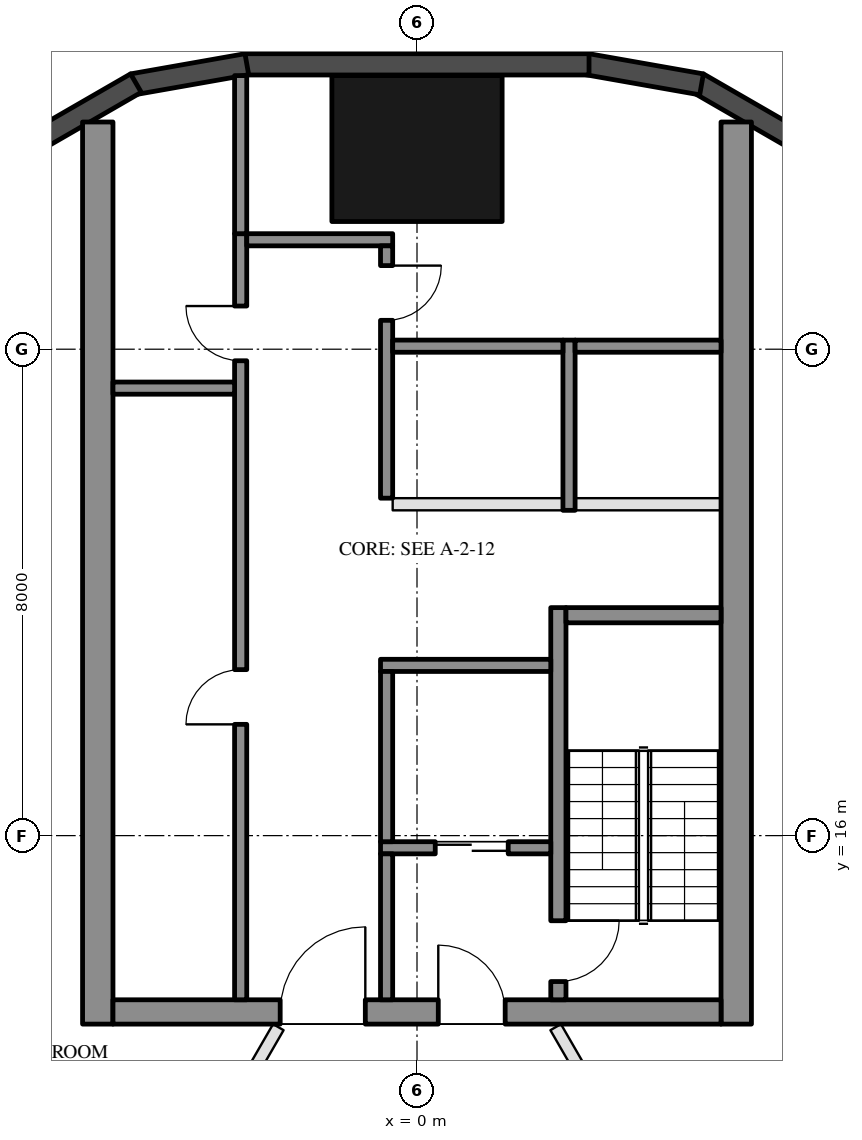
"""IFC4 building model, lengths in metres.
Left out: names, types, materials, properties, quantities, classifications, styles, units other than length and angle.
Written with IfcOpenShell. Run it as: python <this file> out.ifc"""

import sys

from ifc_helpers import new_model, si_unit, direction, frame, frame_2d, origin, origin_2d, place, context, subcontext, project, spatial, rectangle, hollow_rectangle, extrude, element, fill, save


model = new_model("IFC4")
c1 = context("Model", 3, precision=1e-05, world=origin(), true_north=direction((0.0, 1.0)))
c2 = subcontext(c1, "Body", "Model", "MODEL_VIEW")
j1 = project(units=[si_unit("LENGTHUNIT", "METRE"), si_unit("PLANEANGLEUNIT", "RADIAN")], contexts=[c1])
p1 = place(None, origin())
s1 = spatial("IfcSite", under=j1, at=p1, CompositionType="ELEMENT")
p2 = place(p1, origin())
s2 = spatial("IfcBuilding", under=s1, at=p2, CompositionType="ELEMENT")
p3 = place(p2, frame((0.0, 0.0, 57.6)))
s3 = spatial("IfcBuildingStorey", under=s2, at=p3, CompositionType="ELEMENT", Elevation=57.6)
p4 = place(p3, frame((0.0, 27.3, 0.0), z_axis=(0.0, 0.0, 1.0), x_axis=(1.0, 0.0, 0.0)))
e1 = element("IfcColumn", 1, at=p4, inside=s3, PredefinedType="COLUMN", context=c2, shape_type="SweptSolid", body=[
    extrude(hollow_rectangle(XDim=2.8, YDim=2.4, WallThickness=0.07, at=origin_2d()), origin(), (0.0, 0.0, 1.0), 3.7),
])
for number, where, z_axis, x_axis in (
    (2, (6.277, 27.422, 0.0), (0.0, 0.0, 1.0), (-0.866, 0.5, 0.0)),
    (3, (4.68, 28.356, 0.0), (0.0, 0.0, 1.0), (-0.985, 0.174, 0.0)),
):
    element("IfcWall", number, at=place(p3, frame(where, z_axis=z_axis, x_axis=x_axis)), inside=s3, PredefinedType="SOLIDWALL", context=c2, shape_type="SweptSolid", body=[
        extrude(rectangle(XDim=1.91, YDim=0.35, at=frame_2d((0.955, 0.0))), origin(), (0.0, 0.0, 1.0), 3.55),
    ])
p5 = place(p3, frame((2.829, 28.685, 0.0), z_axis=(0.0, 0.0, 1.0), x_axis=(-1.0, 0.0, 0.0)))
e4 = element("IfcWall", 4, at=p5, inside=s3, PredefinedType="SOLIDWALL", context=c2, shape_type="SweptSolid", body=[
    extrude(rectangle(XDim=5.658, YDim=0.35, at=frame_2d((2.829, 0.0))), origin(), (0.0, 0.0, 1.0), 3.55),
])
for number, where, z_axis, x_axis in (
    (5, (-2.799, 28.688, 0.0), (0.0, 0.0, 1.0), (-0.985, -0.174, 0.0)),
    (6, (-4.623, 28.377, 0.0), (0.0, 0.0, 1.0), (-0.866, -0.5, 0.0)),
):
    element("IfcWall", number, at=place(p3, frame(where, z_axis=z_axis, x_axis=x_axis)), inside=s3, PredefinedType="SOLIDWALL", context=c2, shape_type="SweptSolid", body=[
        extrude(rectangle(XDim=1.91, YDim=0.35, at=frame_2d((0.955, 0.0))), origin(), (0.0, 0.0, 1.0), 3.55),
    ])
for number, where, z_axis, x_axis in (
    (7, (5.25, 12.9, 0.0), (0.0, 0.0, 1.0), (0.0, 1.0, 0.0)),
    (8, (-5.25, 12.9, 0.0), (0.0, 0.0, 1.0), (0.0, 1.0, 0.0)),
):
    element("IfcWall", number, at=place(p3, frame(where, z_axis=z_axis, x_axis=x_axis)), inside=s3, PredefinedType="SHEAR", context=c2, shape_type="SweptSolid", body=[
        extrude(rectangle(XDim=14.837, YDim=0.5, at=frame_2d((7.418, 0.0))), origin(), (0.0, 0.0, 1.0), 3.5),
    ])
p6 = place(p3, frame((5.0, 13.1, 0.0), z_axis=(0.0, 0.0, 1.0), x_axis=(-1.0, 0.0, 0.0)))
e9 = element("IfcWall", 9, at=p6, inside=s3, PredefinedType="SHEAR", context=c2, shape_type="SweptSolid", body=[
    extrude(rectangle(XDim=10.0, YDim=0.4, at=frame_2d((5.0, 0.0))), origin(), (0.0, 0.0, 1.0), 3.5),
])
p7 = place(p6, frame((3.55, 0.0, 0.0)))
e10 = element("IfcOpeningElement", 10, at=p7, cuts=e9, PredefinedType="OPENING", context=c2, shape_type="SweptSolid", body=[
    extrude(rectangle(XDim=1.1, YDim=2.1, at=frame_2d((0.55, 1.05))), frame((0.0, 0.21, 0.0), z_axis=(0.0, -1.0, 0.0), x_axis=(1.0, 0.0, 0.0)), (0.0, 0.0, 1.0), 0.42),
])
p8 = place(p6, frame((5.85, 0.0, 0.0)))
e11 = element("IfcOpeningElement", 11, at=p8, cuts=e9, PredefinedType="OPENING", context=c2, shape_type="SweptSolid", body=[
    extrude(rectangle(XDim=1.4, YDim=2.1, at=frame_2d((0.7, 1.05))), frame((0.0, 0.21, 0.0), z_axis=(0.0, -1.0, 0.0), x_axis=(1.0, 0.0, 0.0)), (0.0, 0.0, 1.0), 0.42),
])
p9 = place(p3, frame((2.325, 13.3, 0.0), z_axis=(0.0, 0.0, 1.0), x_axis=(0.0, 1.0, 0.0)))
e12 = element("IfcWall", 12, at=p9, inside=s3, PredefinedType="SHEAR", context=c2, shape_type="SweptSolid", body=[
    extrude(rectangle(XDim=6.45, YDim=0.25, at=frame_2d((3.225, 0.0))), origin(), (0.0, 0.0, 1.0), 3.5),
])
p10 = place(p9, frame((0.3, 0.0, 0.0)))
e13 = element("IfcOpeningElement", 13, at=p10, cuts=e12, PredefinedType="OPENING", context=c2, shape_type="SweptSolid", body=[
    extrude(rectangle(XDim=1.0, YDim=2.1, at=frame_2d((0.5, 1.05))), frame((0.0, 0.135, 0.0), z_axis=(0.0, -1.0, 0.0), x_axis=(1.0, 0.0, 0.0)), (0.0, 0.0, 1.0), 0.27),
])
p11 = place(p3, frame((5.0, 19.625, 0.0), z_axis=(0.0, 0.0, 1.0), x_axis=(-1.0, 0.0, 0.0)))
e14 = element("IfcWall", 14, at=p11, inside=s3, PredefinedType="SHEAR", context=c2, shape_type="SweptSolid", body=[
    extrude(rectangle(XDim=2.55, YDim=0.25, at=frame_2d((1.275, 0.0))), origin(), (0.0, 0.0, 1.0), 3.5),
])
p12 = place(p3, frame((2.2, 18.8, 0.0), z_axis=(0.0, 0.0, 1.0), x_axis=(-1.0, 0.0, 0.0)))
e15 = element("IfcWall", 15, at=p12, inside=s3, PredefinedType="SHEAR", context=c2, shape_type="SweptSolid", body=[
    extrude(rectangle(XDim=2.8, YDim=0.2, at=frame_2d((1.4, 0.0))), origin(), (0.0, 0.0, 1.0), 3.5),
])
p13 = place(p3, frame((2.2, 15.8, 0.0), z_axis=(0.0, 0.0, 1.0), x_axis=(-1.0, 0.0, 0.0)))
e16 = element("IfcWall", 16, at=p13, inside=s3, PredefinedType="SHEAR", context=c2, shape_type="SweptSolid", body=[
    extrude(rectangle(XDim=2.8, YDim=0.2, at=frame_2d((1.4, 0.0))), origin(), (0.0, 0.0, 1.0), 3.5),
])
p14 = place(p13, frame((0.7, 0.0, 0.0)))
e17 = element("IfcOpeningElement", 17, at=p14, cuts=e16, PredefinedType="OPENING", context=c2, shape_type="SweptSolid", body=[
    extrude(rectangle(XDim=1.2, YDim=2.1, at=frame_2d((0.6, 1.05))), frame((0.0, 0.11, 0.0), z_axis=(0.0, -1.0, 0.0), x_axis=(1.0, 0.0, 0.0)), (0.0, 0.0, 1.0), 0.22),
])
p15 = place(p3, frame((-0.5, 15.9, 0.0), z_axis=(0.0, 0.0, 1.0), x_axis=(0.0, 1.0, 0.0)))
e18 = element("IfcWall", 18, at=p15, inside=s3, PredefinedType="SHEAR", context=c2, shape_type="SweptSolid", body=[
    extrude(rectangle(XDim=2.8, YDim=0.2, at=frame_2d((1.4, 0.0))), origin(), (0.0, 0.0, 1.0), 3.5),
])
p16 = place(p3, frame((-0.5, 13.3, 0.0), z_axis=(0.0, 0.0, 1.0), x_axis=(0.0, 1.0, 0.0)))
e19 = element("IfcWall", 19, at=p16, inside=s3, PredefinedType="SHEAR", context=c2, shape_type="SweptSolid", body=[
    extrude(rectangle(XDim=2.4, YDim=0.2, at=frame_2d((1.2, 0.0))), origin(), (0.0, 0.0, 1.0), 3.5),
])
p17 = place(p3, frame((-2.9, 13.3, 0.0), z_axis=(0.0, 0.0, 1.0), x_axis=(0.0, 1.0, 0.0)))
e20 = element("IfcWall", 20, at=p17, inside=s3, PredefinedType="SHEAR", context=c2, shape_type="SweptSolid", body=[
    extrude(rectangle(XDim=12.6, YDim=0.2, at=frame_2d((6.3, 0.0))), origin(), (0.0, 0.0, 1.0), 3.5),
])
p18 = place(p17, frame((4.53, 0.0, 0.0)))
e21 = element("IfcOpeningElement", 21, at=p18, cuts=e20, PredefinedType="OPENING", context=c2, shape_type="SweptSolid", body=[
    extrude(rectangle(XDim=0.9, YDim=2.1, at=frame_2d((0.45, 1.05))), frame((0.0, 0.11, 0.0), z_axis=(0.0, -1.0, 0.0), x_axis=(1.0, 0.0, 0.0)), (0.0, 0.0, 1.0), 0.22),
])
p19 = place(p17, frame((10.51, 0.0, 0.0)))
e22 = element("IfcOpeningElement", 22, at=p19, cuts=e20, PredefinedType="OPENING", context=c2, shape_type="SweptSolid", body=[
    extrude(rectangle(XDim=0.9, YDim=2.1, at=frame_2d((0.45, 1.05))), frame((0.0, 0.11, 0.0), z_axis=(0.0, -1.0, 0.0), x_axis=(1.0, 0.0, 0.0)), (0.0, 0.0, 1.0), 0.22),
])
p20 = place(p3, frame((-0.4, 25.8, 0.0), z_axis=(0.0, 0.0, 1.0), x_axis=(-1.0, 0.0, 0.0)))
e23 = element("IfcWall", 23, at=p20, inside=s3, PredefinedType="SHEAR", context=c2, shape_type="SweptSolid", body=[
    extrude(rectangle(XDim=2.4, YDim=0.2, at=frame_2d((1.2, 0.0))), origin(), (0.0, 0.0, 1.0), 3.5),
])
p21 = place(p3, frame((-0.5, 21.55, 0.0), z_axis=(0.0, 0.0, 1.0), x_axis=(0.0, 1.0, 0.0)))
e24 = element("IfcWall", 24, at=p21, inside=s3, PredefinedType="SHEAR", context=c2, shape_type="SweptSolid", body=[
    extrude(rectangle(XDim=4.15, YDim=0.2, at=frame_2d((2.075, 0.0))), origin(), (0.0, 0.0, 1.0), 3.5),
])
p22 = place(p21, frame((2.925, 0.0, 0.0)))
e25 = element("IfcOpeningElement", 25, at=p22, cuts=e24, PredefinedType="OPENING", context=c2, shape_type="SweptSolid", body=[
    extrude(rectangle(XDim=0.9, YDim=2.1, at=frame_2d((0.45, 1.05))), frame((0.0, 0.11, 0.0), z_axis=(0.0, -1.0, 0.0), x_axis=(1.0, 0.0, 0.0)), (0.0, 0.0, 1.0), 0.22),
])
p23 = place(p3, frame((-3.0, 23.36, 0.0), z_axis=(0.0, 0.0, 1.0), x_axis=(-1.0, 0.0, 0.0)))
e26 = element("IfcWall", 26, at=p23, inside=s3, PredefinedType="SHEAR", context=c2, shape_type="SweptSolid", body=[
    extrude(rectangle(XDim=2.0, YDim=0.2, at=frame_2d((1.0, 0.0))), origin(), (0.0, 0.0, 1.0), 3.5),
])
p24 = place(p3, frame((-2.9, 25.9, 0.0), z_axis=(0.0, 0.0, 1.0), x_axis=(0.0, 1.0, 0.0)))
e27 = element("IfcWall", 27, at=p24, inside=s3, PredefinedType="SHEAR", context=c2, shape_type="SweptSolid", body=[
    extrude(rectangle(XDim=2.6, YDim=0.2, at=frame_2d((1.3, 0.0))), origin(), (0.0, 0.0, 1.0), 3.5),
])
p25 = place(p3, frame((2.5, 21.35, 0.0), z_axis=(0.0, 0.0, 1.0), x_axis=(0.0, 1.0, 0.0)))
e28 = element("IfcWall", 28, at=p25, inside=s3, PredefinedType="SHEAR", context=c2, shape_type="SweptSolid", body=[
    extrude(rectangle(XDim=2.8, YDim=0.2, at=frame_2d((1.4, 0.0))), origin(), (0.0, 0.0, 1.0), 3.5),
])
p26 = place(p3, frame((5.0, 24.05, 0.0), z_axis=(0.0, 0.0, 1.0), x_axis=(-1.0, 0.0, 0.0)))
e29 = element("IfcWall", 29, at=p26, inside=s3, PredefinedType="SHEAR", context=c2, shape_type="SweptSolid", body=[
    extrude(rectangle(XDim=2.4, YDim=0.2, at=frame_2d((1.2, 0.0))), origin(), (0.0, 0.0, 1.0), 3.5),
])
p27 = place(p3, frame((2.4, 24.05, 0.0), z_axis=(0.0, 0.0, 1.0), x_axis=(-1.0, 0.0, 0.0)))
e30 = element("IfcWall", 30, at=p27, inside=s3, PredefinedType="SHEAR", context=c2, shape_type="SweptSolid", body=[
    extrude(rectangle(XDim=2.8, YDim=0.2, at=frame_2d((1.4, 0.0))), origin(), (0.0, 0.0, 1.0), 3.5),
])
p28 = place(p3, frame((5.0, 21.45, 0.0), z_axis=(0.0, 0.0, 1.0), x_axis=(-1.0, 0.0, 0.0)))
e31 = element("IfcWall", 31, at=p28, inside=s3, PredefinedType="PARTITIONING", context=c2, shape_type="SweptSolid", body=[
    extrude(rectangle(XDim=2.4, YDim=0.2, at=frame_2d((1.2, 0.0))), origin(), (0.0, 0.0, 1.0), 3.5),
])
p29 = place(p3, frame((2.4, 21.45, 0.0), z_axis=(0.0, 0.0, 1.0), x_axis=(-1.0, 0.0, 0.0)))
e32 = element("IfcWall", 32, at=p29, inside=s3, PredefinedType="PARTITIONING", context=c2, shape_type="SweptSolid", body=[
    extrude(rectangle(XDim=2.8, YDim=0.2, at=frame_2d((1.4, 0.0))), origin(), (0.0, 0.0, 1.0), 3.5),
])
p30 = place(p3, frame((-13.936, 12.622, 0.0), z_axis=(0.0, 0.0, 1.0), x_axis=(0.872898889426, -0.487901146585, 0.0)))
e33 = element("IfcWall", 33, at=p30, inside=s3, PredefinedType="PARTITIONING", context=c2, shape_type="SweptSolid", body=[
    extrude(rectangle(XDim=10.081, YDim=0.2, at=frame_2d((5.041, 0.0))), origin(), (0.0, 0.0, 1.0), 2.95),
])
p31 = place(p3, frame((2.281, 12.85, 0.0), z_axis=(0.0, 0.0, 1.0), x_axis=(0.499997198377, -0.866027021296, 0.0)))
e34 = element("IfcWall", 34, at=p31, inside=s3, PredefinedType="PARTITIONING", context=c2, shape_type="SweptSolid", body=[
    extrude(rectangle(XDim=8.487, YDim=0.2, at=frame_2d((4.243, 0.0))), origin(), (0.0, 0.0, 1.0), 2.95),
])
p32 = place(p31, frame((3.743, 0.0, 0.0)))
e35 = element("IfcOpeningElement", 35, at=p32, cuts=e34, PredefinedType="OPENING", context=c2, shape_type="SweptSolid", body=[
    extrude(rectangle(XDim=1.0, YDim=2.1, at=frame_2d((0.5, 1.05))), frame((0.0, 0.11, 0.0), z_axis=(0.0, -1.0, 0.0), x_axis=(1.0, 0.0, 0.0)), (0.0, 0.0, 1.0), 0.22),
])
p33 = place(p3, frame((-5.174, 7.838, 0.0), z_axis=(0.0, 0.0, 1.0), x_axis=(0.499973220989, 0.866040864101, 0.0)))
e36 = element("IfcWall", 36, at=p33, inside=s3, PredefinedType="PARTITIONING", context=c2, shape_type="SweptSolid", body=[
    extrude(rectangle(XDim=5.787, YDim=0.2, at=frame_2d((2.894, 0.0))), origin(), (0.0, 0.0, 1.0), 2.95),
])
p34 = place(p33, frame((2.393, 0.0, 0.0)))
e37 = element("IfcOpeningElement", 37, at=p34, cuts=e36, PredefinedType="OPENING", context=c2, shape_type="SweptSolid", body=[
    extrude(rectangle(XDim=1.0, YDim=2.1, at=frame_2d((0.5, 1.05))), frame((0.0, 0.11, 0.0), z_axis=(0.0, -1.0, 0.0), x_axis=(1.0, 0.0, 0.0)), (0.0, 0.0, 1.0), 0.22),
])
p35 = place(p14, origin())
e38 = element("IfcDoor", 38, at=p35, inside=s3, OperationType="DOUBLE_DOOR_SLIDING", PredefinedType="DOOR", context=c2, shape_type="SweptSolid", body=[
    extrude(rectangle(XDim=1.2, YDim=2.1, at=frame_2d((0.6, 1.05))), frame((0.0, 0.025, 0.0), z_axis=(0.0, -1.0, 0.0), x_axis=(1.0, 0.0, 0.0)), (0.0, 0.0, 1.0), 0.05),
])
fill(e17, e38)
p36 = place(p18, origin())
e39 = element("IfcDoor", 39, at=p36, inside=s3, OperationType="SINGLE_SWING_LEFT", PredefinedType="DOOR", context=c2, shape_type="SweptSolid", body=[
    extrude(rectangle(XDim=0.9, YDim=2.1, at=frame_2d((0.45, 1.05))), frame((0.0, 0.025, 0.0), z_axis=(0.0, -1.0, 0.0), x_axis=(1.0, 0.0, 0.0)), (0.0, 0.0, 1.0), 0.05),
])
fill(e21, e39)
p37 = place(p19, origin())
e40 = element("IfcDoor", 40, at=p37, inside=s3, OperationType="SINGLE_SWING_RIGHT", PredefinedType="DOOR", context=c2, shape_type="SweptSolid", body=[
    extrude(rectangle(XDim=0.9, YDim=2.1, at=frame_2d((0.45, 1.05))), frame((0.0, 0.025, 0.0), z_axis=(0.0, -1.0, 0.0), x_axis=(1.0, 0.0, 0.0)), (0.0, 0.0, 1.0), 0.05),
])
fill(e22, e40)
p38 = place(p22, frame((0.9, 0.0, 0.0), z_axis=(0.0, 0.0, 1.0), x_axis=(-1.0, 0.0, 0.0)))
e41 = element("IfcDoor", 41, at=p38, inside=s3, OperationType="SINGLE_SWING_LEFT", PredefinedType="DOOR", context=c2, shape_type="SweptSolid", body=[
    extrude(rectangle(XDim=0.9, YDim=2.1, at=frame_2d((0.45, 1.05))), frame((0.0, 0.025, 0.0), z_axis=(0.0, -1.0, 0.0), x_axis=(1.0, 0.0, 0.0)), (0.0, 0.0, 1.0), 0.05),
])
fill(e25, e41)
p39 = place(p7, frame((1.1, 0.0, 0.0), z_axis=(0.0, 0.0, 1.0), x_axis=(-1.0, 0.0, 0.0)))
e42 = element("IfcDoor", 42, at=p39, inside=s3, OperationType="SINGLE_SWING_LEFT", PredefinedType="DOOR", context=c2, shape_type="SweptSolid", body=[
    extrude(rectangle(XDim=1.1, YDim=2.1, at=frame_2d((0.55, 1.05))), frame((0.0, 0.025, 0.0), z_axis=(0.0, -1.0, 0.0), x_axis=(1.0, 0.0, 0.0)), (0.0, 0.0, 1.0), 0.05),
])
fill(e10, e42)
p40 = place(p8, frame((1.4, 0.0, 0.0), z_axis=(0.0, 0.0, 1.0), x_axis=(-1.0, 0.0, 0.0)))
e43 = element("IfcDoor", 43, at=p40, inside=s3, OperationType="DOUBLE_DOOR_SINGLE_SWING", PredefinedType="DOOR", context=c2, shape_type="SweptSolid", body=[
    extrude(rectangle(XDim=1.4, YDim=2.1, at=frame_2d((0.7, 1.05))), frame((0.0, 0.025, 0.0), z_axis=(0.0, -1.0, 0.0), x_axis=(1.0, 0.0, 0.0)), (0.0, 0.0, 1.0), 0.05),
])
fill(e11, e43)
p41 = place(p10, frame((1.0, 0.0, 0.0), z_axis=(0.0, 0.0, 1.0), x_axis=(-1.0, 0.0, 0.0)))
e44 = element("IfcDoor", 44, at=p41, inside=s3, OperationType="SINGLE_SWING_LEFT", PredefinedType="DOOR", context=c2, shape_type="SweptSolid", body=[
    extrude(rectangle(XDim=1.0, YDim=2.1, at=frame_2d((0.5, 1.05))), frame((0.0, 0.025, 0.0), z_axis=(0.0, -1.0, 0.0), x_axis=(1.0, 0.0, 0.0)), (0.0, 0.0, 1.0), 0.05),
])
fill(e13, e44)
save(model, sys.argv[1])
